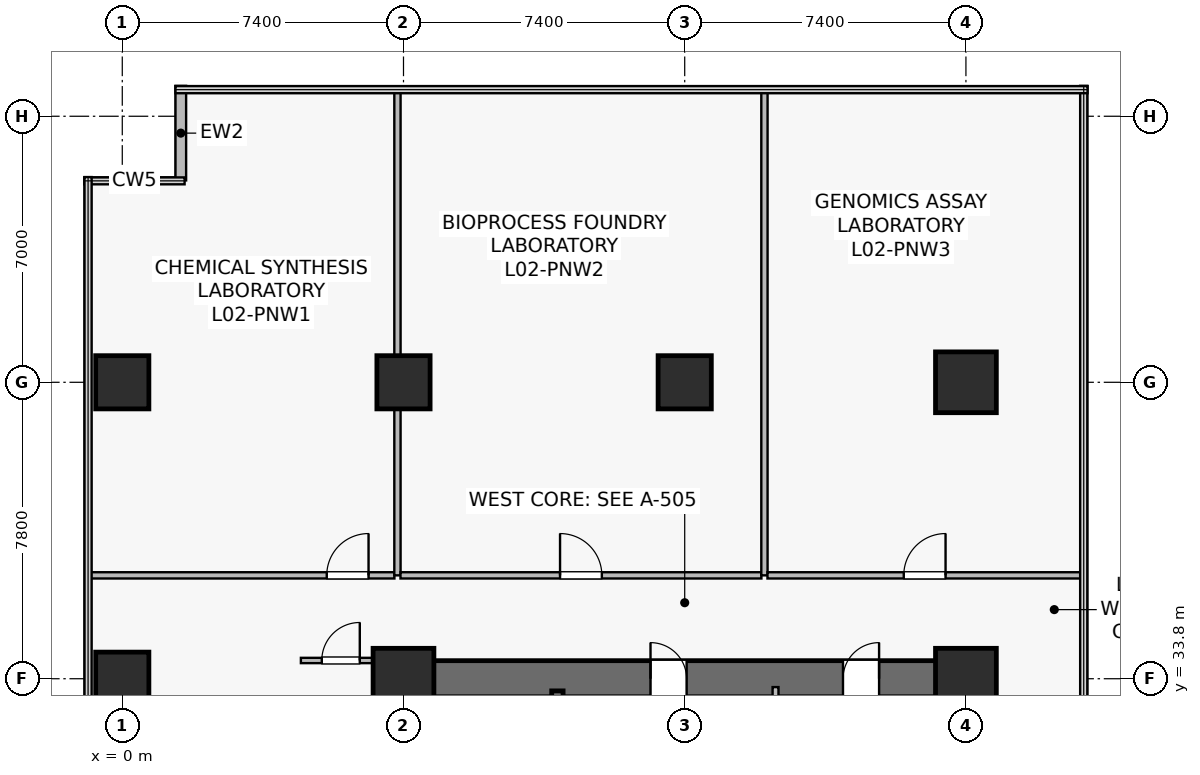
"""IFC4 building model, lengths in metres.
Left out: names, types, materials, properties, quantities, classifications, styles, units other than length and angle.
Written with IfcOpenShell. Run it as: python <this file> out.ifc"""

import sys

from ifc_helpers import new_model, si_unit, direction, frame, frame_2d, origin, origin_2d, place, context, subcontext, project, spatial, rectangle, extrude, source, transform, mapped, element, fill, save


model = new_model("IFC4")
c1 = context("Model", 3, precision=1e-05, world=origin(), true_north=direction((0.0, 1.0)))
c2 = subcontext(c1, "Body", "Model", "MODEL_VIEW")
j1 = project(units=[si_unit("LENGTHUNIT", "METRE"), si_unit("PLANEANGLEUNIT", "RADIAN")], contexts=[c1])
p1 = place(None, origin())
s1 = spatial("IfcSite", under=j1, at=p1, CompositionType="ELEMENT")
p2 = place(p1, origin())
s2 = spatial("IfcBuilding", under=s1, at=p2, CompositionType="ELEMENT")
p3 = place(p2, frame((0.0, 0.0, 5.4)))
s3 = spatial("IfcBuildingStorey", under=s2, at=p3, CompositionType="ELEMENT", Elevation=5.4)
p4 = place(p3, frame((6.925, 33.8, 0.0), z_axis=(0.0, 0.0, 1.0), x_axis=(1.0, 0.0, 0.0)))
e1 = element("IfcWall", 1, at=p4, inside=s3, PredefinedType="SHEAR", context=c2, shape_type="SweptSolid", body=[
    extrude(rectangle(XDim=15.75, YDim=0.95, at=frame_2d((7.875, 0.0))), origin(), (0.0, 0.0, 1.0), 4.45),
])
p5 = place(p4, frame((6.975, 0.0, 0.0)))
e2 = element("IfcOpeningElement", 2, at=p5, cuts=e1, PredefinedType="OPENING", context=c2, shape_type="SweptSolid", body=[
    extrude(rectangle(XDim=0.95, YDim=2.15, at=frame_2d((0.475, 1.075))), frame((0.0, 0.485, 0.0), z_axis=(0.0, -1.0, 0.0), x_axis=(1.0, 0.0, 0.0)), (0.0, 0.0, 1.0), 0.97),
])
p6 = place(p4, frame((12.04, 0.0, 0.0)))
e3 = element("IfcOpeningElement", 3, at=p6, cuts=e1, PredefinedType="OPENING", context=c2, shape_type="SweptSolid", body=[
    extrude(rectangle(XDim=0.95, YDim=2.15, at=frame_2d((0.475, 1.075))), frame((0.0, 0.485, 0.0), z_axis=(0.0, -1.0, 0.0), x_axis=(1.0, 0.0, 0.0)), (0.0, 0.0, 1.0), 0.97),
])
p7 = place(p3, frame((11.45, 24.85, 0.0), z_axis=(0.0, 0.0, 1.0), x_axis=(0.0, 1.0, 0.0)))
e4 = element("IfcWall", 4, at=p7, inside=s3, PredefinedType="SHEAR", context=c2, shape_type="SweptSolid", body=[
    extrude(rectangle(XDim=8.63, YDim=0.3, at=frame_2d((4.315, 0.0))), origin(), (0.0, 0.0, 1.0), 4.45),
])
p8 = place(p7, frame((0.42, 0.0, 0.0)))
e5 = element("IfcOpeningElement", 5, at=p8, cuts=e4, PredefinedType="OPENING", context=c2, shape_type="SweptSolid", body=[
    extrude(rectangle(XDim=1.1, YDim=2.15, at=frame_2d((0.55, 1.075))), frame((0.0, 0.16, 0.0), z_axis=(0.0, -1.0, 0.0), x_axis=(1.0, 0.0, 0.0)), (0.0, 0.0, 1.0), 0.32),
])
m1 = source(origin(), c2, "Body", "SweptSolid", [
    extrude(rectangle(XDim=1.6, YDim=1.6, at=origin_2d()), origin(), (0.0, 0.0, 1.0), 4.8),
])
for number, where, z_axis, x_axis in (
    (6, (7.4, 33.8, 0.0), (0.0, 0.0, 1.0), (1.0, 0.0, 0.0)),
    (7, (22.2, 33.8, 0.0), (0.0, 0.0, 1.0), (1.0, 0.0, 0.0)),
):
    element("IfcColumn", number, at=place(p3, frame(where, z_axis=z_axis, x_axis=x_axis)), inside=s3, PredefinedType="COLUMN", context=c2, shape_type="MappedRepresentation", body=[
        mapped(m1, transform((0.0, 0.0, 0.0), scale=1.0)),
    ])
m2 = source(origin(), c2, "Body", "SweptSolid", [
    extrude(rectangle(XDim=1.4, YDim=1.4, at=origin_2d()), origin(), (0.0, 0.0, 1.0), 4.8),
])
p9 = place(p3, frame((14.8, 41.6, 0.0), z_axis=(0.0, 0.0, 1.0), x_axis=(1.0, 0.0, 0.0)))
e8 = element("IfcColumn", 8, at=p9, inside=s3, PredefinedType="COLUMN", context=c2, shape_type="MappedRepresentation", body=[
    mapped(m2, transform((0.0, 0.0, 0.0), scale=1.0)),
])
p10 = place(p3, frame((22.2, 41.6, 0.0), z_axis=(0.0, 0.0, 1.0), x_axis=(1.0, 0.0, 0.0)))
e9 = element("IfcColumn", 9, at=p10, inside=s3, PredefinedType="COLUMN", context=c2, shape_type="MappedRepresentation", body=[
    mapped(m1, transform((0.0, 0.0, 0.0), scale=1.0)),
])
for number, where, z_axis, x_axis in (
    (10, (7.4, 41.6, 0.0), (0.0, 0.0, 1.0), (1.0, 0.0, 0.0)),
    (11, (0.0, 33.8, 0.0), (0.0, 0.0, 1.0), (1.0, 0.0, 0.0)),
    (12, (0.0, 41.6, 0.0), (0.0, 0.0, 1.0), (1.0, 0.0, 0.0)),
):
    element("IfcColumn", number, at=place(p3, frame(where, z_axis=z_axis, x_axis=x_axis)), inside=s3, PredefinedType="COLUMN", context=c2, shape_type="MappedRepresentation", body=[
        mapped(m2, transform((0.0, 0.0, 0.0), scale=1.0)),
    ])
p11 = place(p3, frame((1.54, 49.4, 0.0), z_axis=(0.0, 0.0, 1.0), x_axis=(0.0, -1.0, 0.0)))
e13 = element("IfcWall", 13, at=p11, inside=s3, PredefinedType="STANDARD", context=c2, shape_type="SweptSolid", body=[
    extrude(rectangle(XDim=2.488, YDim=0.28, at=frame_2d((1.244, 0.0))), origin(), (0.0, 0.0, 1.0), 4.45),
])
p12 = place(p3, frame((17.19, 29.65, 0.0), z_axis=(0.0, 0.0, 1.0), x_axis=(0.0, 1.0, 0.0)))
e14 = element("IfcWall", 14, at=p12, inside=s3, PredefinedType="PLUMBINGWALL", context=c2, shape_type="SweptSolid", body=[
    extrude(rectangle(XDim=3.93, YDim=0.155, at=frame_2d((1.965, 0.0))), origin(), (0.0, 0.0, 1.0), 4.45),
])
p13 = place(p3, frame((4.7, 34.28, 0.0), z_axis=(0.0, 0.0, 1.0), x_axis=(1.0, 0.0, 0.0)))
e15 = element("IfcWall", 15, at=p13, inside=s3, PredefinedType="PARTITIONING", context=c2, shape_type="SweptSolid", body=[
    extrude(rectangle(XDim=2.1, YDim=0.14, at=frame_2d((1.05, 0.0))), origin(), (0.0, 0.0, 1.0), 4.45),
])
p14 = place(p13, frame((0.55, 0.0, 0.0)))
e16 = element("IfcOpeningElement", 16, at=p14, cuts=e15, PredefinedType="OPENING", context=c2, shape_type="SweptSolid", body=[
    extrude(rectangle(XDim=1.0, YDim=2.15, at=frame_2d((0.5, 1.075))), frame((0.0, 0.08, 0.0), z_axis=(0.0, -1.0, 0.0), x_axis=(1.0, 0.0, 0.0)), (0.0, 0.0, 1.0), 0.16),
])
p15 = place(p3, frame((-0.85, 36.52, 0.0), z_axis=(0.0, 0.0, 1.0), x_axis=(1.0, 0.0, 0.0)))
e17 = element("IfcWall", 17, at=p15, inside=s3, PredefinedType="PARTITIONING", context=c2, shape_type="SweptSolid", body=[
    extrude(rectangle(XDim=8.011, YDim=0.165, at=frame_2d((4.005, 0.0))), origin(), (0.0, 0.0, 1.0), 3.835),
])
p16 = place(p15, frame((6.23, 0.0, 0.0)))
e18 = element("IfcOpeningElement", 18, at=p16, cuts=e17, PredefinedType="OPENING", context=c2, shape_type="SweptSolid", body=[
    extrude(rectangle(XDim=1.1, YDim=2.18, at=frame_2d((0.55, 1.09))), frame((0.0, 0.093, 0.0), z_axis=(0.0, -1.0, 0.0), x_axis=(1.0, 0.0, 0.0)), (0.0, 0.0, 1.0), 0.185),
])
p17 = place(p3, frame((7.241, 36.52, 0.0), z_axis=(0.0, 0.0, 1.0), x_axis=(0.0, 1.0, 0.0)))
e19 = element("IfcWall", 19, at=p17, inside=s3, PredefinedType="PARTITIONING", context=c2, shape_type="SweptSolid", body=[
    extrude(rectangle(XDim=12.77, YDim=0.165, at=frame_2d((6.385, 0.0))), origin(), (0.0, 0.0, 1.0), 3.635),
])
p18 = place(p3, frame((7.321, 36.52, 0.0), z_axis=(0.0, 0.0, 1.0), x_axis=(1.0, 0.0, 0.0)))
e20 = element("IfcWall", 20, at=p18, inside=s3, PredefinedType="PARTITIONING", context=c2, shape_type="SweptSolid", body=[
    extrude(rectangle(XDim=9.497, YDim=0.165, at=frame_2d((4.749, 0.0))), origin(), (0.0, 0.0, 1.0), 3.735),
])
p19 = place(p18, frame((4.198, 0.0, 0.0)))
e21 = element("IfcOpeningElement", 21, at=p19, cuts=e20, PredefinedType="OPENING", context=c2, shape_type="SweptSolid", body=[
    extrude(rectangle(XDim=1.1, YDim=2.18, at=frame_2d((0.55, 1.09))), frame((0.0, 0.093, 0.0), z_axis=(0.0, -1.0, 0.0), x_axis=(1.0, 0.0, 0.0)), (0.0, 0.0, 1.0), 0.185),
])
p20 = place(p3, frame((16.898, 36.52, 0.0), z_axis=(0.0, 0.0, 1.0), x_axis=(0.0, 1.0, 0.0)))
e22 = element("IfcWall", 22, at=p20, inside=s3, PredefinedType="PARTITIONING", context=c2, shape_type="SweptSolid", body=[
    extrude(rectangle(XDim=12.77, YDim=0.165, at=frame_2d((6.385, 0.0))), origin(), (0.0, 0.0, 1.0), 3.635),
])
p21 = place(p3, frame((16.978, 36.52, 0.0), z_axis=(0.0, 0.0, 1.0), x_axis=(1.0, 0.0, 0.0)))
e23 = element("IfcWall", 23, at=p21, inside=s3, PredefinedType="PARTITIONING", context=c2, shape_type="SweptSolid", body=[
    extrude(rectangle(XDim=8.272, YDim=0.165, at=frame_2d((4.136, 0.0))), origin(), (0.0, 0.0, 1.0), 3.735),
])
p22 = place(p21, frame((3.586, 0.0, 0.0)))
e24 = element("IfcOpeningElement", 24, at=p22, cuts=e23, PredefinedType="OPENING", context=c2, shape_type="SweptSolid", body=[
    extrude(rectangle(XDim=1.1, YDim=2.18, at=frame_2d((0.55, 1.09))), frame((0.0, 0.093, 0.0), z_axis=(0.0, -1.0, 0.0), x_axis=(1.0, 0.0, 0.0)), (0.0, 0.0, 1.0), 0.185),
])
m3 = source(origin(), c2, "Body", "SweptSolid", [
    extrude(rectangle(XDim=0.95, YDim=2.15, at=frame_2d((0.475, 1.075))), frame((0.0, 0.025, 0.0), z_axis=(0.0, -1.0, 0.0), x_axis=(1.0, 0.0, 0.0)), (0.0, 0.0, 1.0), 0.05),
])
p23 = place(p5, origin())
e25 = element("IfcDoor", 25, at=p23, inside=s3, OperationType="SINGLE_SWING_LEFT", PredefinedType="DOOR", context=c2, shape_type="MappedRepresentation", body=[
    mapped(m3, transform((0.0, 0.0, 0.0), scale=1.0)),
])
fill(e2, e25)
p24 = place(p6, origin())
e26 = element("IfcDoor", 26, at=p24, inside=s3, OperationType="SINGLE_SWING_RIGHT", PredefinedType="DOOR", context=c2, shape_type="MappedRepresentation", body=[
    mapped(m3, transform((0.0, 0.0, 0.0), scale=1.0)),
])
fill(e3, e26)
m4 = source(origin(), c2, "Body", "SweptSolid", [
    extrude(rectangle(XDim=1.0, YDim=2.15, at=frame_2d((0.5, 1.075))), frame((0.0, 0.025, 0.0), z_axis=(0.0, -1.0, 0.0), x_axis=(1.0, 0.0, 0.0)), (0.0, 0.0, 1.0), 0.05),
])
p25 = place(p14, origin())
e27 = element("IfcDoor", 27, at=p25, inside=s3, OperationType="SINGLE_SWING_RIGHT", PredefinedType="DOOR", context=c2, shape_type="MappedRepresentation", body=[
    mapped(m4, transform((0.0, 0.0, 0.0), scale=1.0)),
])
fill(e16, e27)
m5 = source(origin(), c2, "Body", "SweptSolid", [
    extrude(rectangle(XDim=1.1, YDim=2.18, at=frame_2d((0.55, 1.09))), frame((0.0, 0.025, 0.0), z_axis=(0.0, -1.0, 0.0), x_axis=(1.0, 0.0, 0.0)), (0.0, 0.0, 1.0), 0.05),
])
p26 = place(p16, origin())
e28 = element("IfcDoor", 28, at=p26, inside=s3, OperationType="SINGLE_SWING_RIGHT", PredefinedType="DOOR", context=c2, shape_type="MappedRepresentation", body=[
    mapped(m5, transform((0.0, 0.0, 0.0), scale=1.0)),
])
fill(e18, e28)
p27 = place(p19, origin())
e29 = element("IfcDoor", 29, at=p27, inside=s3, OperationType="SINGLE_SWING_LEFT", PredefinedType="DOOR", context=c2, shape_type="MappedRepresentation", body=[
    mapped(m5, transform((0.0, 0.0, 0.0), scale=1.0)),
])
fill(e21, e29)
p28 = place(p22, origin())
e30 = element("IfcDoor", 30, at=p28, inside=s3, OperationType="SINGLE_SWING_RIGHT", PredefinedType="DOOR", context=c2, shape_type="MappedRepresentation", body=[
    mapped(m5, transform((0.0, 0.0, 0.0), scale=1.0)),
])
fill(e24, e30)
save(model, sys.argv[1])
